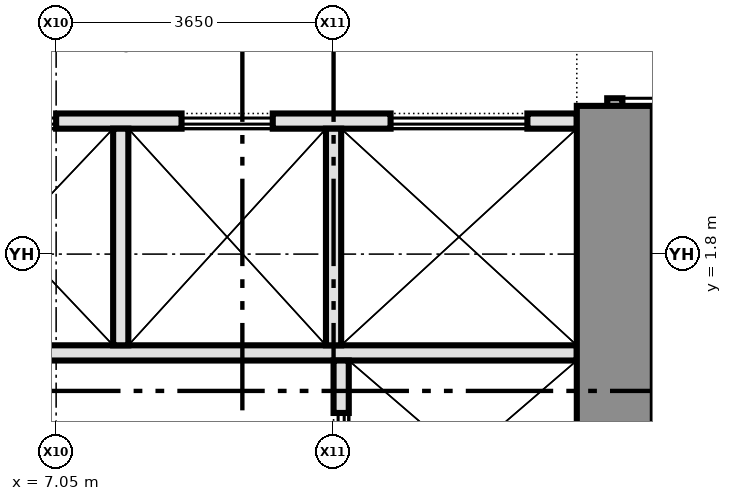
"""IFC4 building model, lengths in metres.
Left out: names, types, materials, properties, quantities, classifications, styles, units other than length and angle.
Written with IfcOpenShell. Run it as: python <this file> out.ifc"""

import sys

from ifc_helpers import new_model, si_unit, direction, frame, frame_2d, origin, place, context, subcontext, project, spatial, rectangle, extrude, element, fill, save


model = new_model("IFC4")
c1 = context("Model", 3, precision=1e-05, world=origin(), true_north=direction((0.0, 1.0)))
c2 = subcontext(c1, "Body", "Model", "MODEL_VIEW")
j1 = project(units=[si_unit("LENGTHUNIT", "METRE"), si_unit("PLANEANGLEUNIT", "RADIAN")], contexts=[c1])
p1 = place(None, origin())
s1 = spatial("IfcSite", under=j1, at=p1, CompositionType="ELEMENT")
p2 = place(p1, origin())
s2 = spatial("IfcBuilding", under=s1, at=p2, CompositionType="ELEMENT")
p3 = place(p2, frame((0.0, 0.0, 95.2)))
s3 = spatial("IfcBuildingStorey", under=s2, at=p3, CompositionType="ELEMENT", Elevation=95.2)
p4 = place(p3, frame((14.4, 5.75, 0.0), z_axis=(0.0, 0.0, 1.0), x_axis=(0.0, -1.0, 0.0)))
e1 = element("IfcWall", 1, at=p4, inside=s3, PredefinedType="PARTITIONING", context=c2, shape_type="SweptSolid", body=[
    extrude(rectangle(XDim=2.0, YDim=0.2, at=frame_2d((1.0, 0.0))), origin(), (0.0, 0.0, 1.0), 2.4),
])
p5 = place(p4, frame((0.1, 0.0, 0.0)))
e2 = element("IfcOpeningElement", 2, at=p5, cuts=e1, PredefinedType="OPENING", context=c2, shape_type="SweptSolid", body=[
    extrude(rectangle(XDim=1.8, YDim=2.1, at=frame_2d((0.9, 1.05))), frame((0.0, 0.11, 0.0), z_axis=(0.0, -1.0, 0.0), x_axis=(1.0, 0.0, 0.0)), (0.0, 0.0, 1.0), 0.22),
])
p6 = place(p3, frame((14.4, 3.75, 0.0), z_axis=(0.0, 0.0, 1.0), x_axis=(0.0, -1.0, 0.0)))
e3 = element("IfcWall", 3, at=p6, inside=s3, PredefinedType="SHEAR", context=c2, shape_type="SweptSolid", body=[
    extrude(rectangle(XDim=6.13, YDim=1.0, at=frame_2d((3.065, 0.0))), origin(), (0.0, 0.0, 1.0), 4.2),
])
p7 = place(p3, frame((13.9, 3.55, 0.0), z_axis=(0.0, 0.0, 1.0), x_axis=(-1.0, 0.0, 0.0)))
e4 = element("IfcWall", 4, at=p7, inside=s3, PredefinedType="PARTITIONING", context=c2, shape_type="SweptSolid", body=[
    extrude(rectangle(XDim=8.8, YDim=0.2, at=frame_2d((4.4, 0.0))), origin(), (0.0, 0.0, 1.0), 4.2),
])
p8 = place(p7, frame((0.65, 0.0, 0.0)))
e5 = element("IfcOpeningElement", 5, at=p8, cuts=e4, PredefinedType="OPENING", context=c2, shape_type="SweptSolid", body=[
    extrude(rectangle(XDim=1.8, YDim=2.1, at=frame_2d((0.9, 1.05))), frame((0.0, 0.11, 0.0), z_axis=(0.0, -1.0, 0.0), x_axis=(1.0, 0.0, 0.0)), (0.0, 0.0, 1.0), 0.22),
])
p9 = place(p7, frame((4.0, 0.0, 0.0)))
e6 = element("IfcOpeningElement", 6, at=p9, cuts=e4, PredefinedType="OPENING", context=c2, shape_type="SweptSolid", body=[
    extrude(rectangle(XDim=1.2, YDim=2.1, at=frame_2d((0.6, 1.05))), frame((0.0, 0.11, 0.0), z_axis=(0.0, -1.0, 0.0), x_axis=(1.0, 0.0, 0.0)), (0.0, 0.0, 1.0), 0.22),
])
p10 = place(p7, frame((6.85, 0.0, 0.0)))
e7 = element("IfcOpeningElement", 7, at=p10, cuts=e4, PredefinedType="OPENING", context=c2, shape_type="SweptSolid", body=[
    extrude(rectangle(XDim=1.2, YDim=2.1, at=frame_2d((0.6, 1.05))), frame((0.0, 0.11, 0.0), z_axis=(0.0, -1.0, 0.0), x_axis=(1.0, 0.0, 0.0)), (0.0, 0.0, 1.0), 0.22),
])
p11 = place(p3, frame((13.9, 0.5, 0.0), z_axis=(0.0, 0.0, 1.0), x_axis=(-1.0, 0.0, 0.0)))
e8 = element("IfcWall", 8, at=p11, inside=s3, PredefinedType="PARTITIONING", context=c2, shape_type="SweptSolid", body=[
    extrude(rectangle(XDim=8.8, YDim=0.2, at=frame_2d((4.4, 0.0))), origin(), (0.0, 0.0, 1.0), 4.2),
])
p12 = place(p3, frame((10.8, 0.4, 0.0), z_axis=(0.0, 0.0, 1.0), x_axis=(0.0, -1.0, 0.0)))
e9 = element("IfcWall", 9, at=p12, inside=s3, PredefinedType="PARTITIONING", context=c2, shape_type="SweptSolid", body=[
    extrude(rectangle(XDim=2.58, YDim=0.2, at=frame_2d((1.29, 0.0))), origin(), (0.0, 0.0, 1.0), 4.2),
])
p13 = place(p12, frame((0.69, 0.0, 0.0)))
e10 = element("IfcOpeningElement", 10, at=p13, cuts=e9, PredefinedType="OPENING", context=c2, shape_type="SweptSolid", body=[
    extrude(rectangle(XDim=1.2, YDim=2.1, at=frame_2d((0.6, 1.05))), frame((0.0, 0.11, 0.0), z_axis=(0.0, -1.0, 0.0), x_axis=(1.0, 0.0, 0.0)), (0.0, 0.0, 1.0), 0.22),
])
for number, where, z_axis, x_axis in (
    (11, (10.7, 3.45, 0.0), (0.0, 0.0, 1.0), (0.0, -1.0, 0.0)),
    (12, (7.9, 3.45, 0.0), (0.0, 0.0, 1.0), (0.0, -1.0, 0.0)),
):
    element("IfcWall", number, at=place(p3, frame(where, z_axis=z_axis, x_axis=x_axis)), inside=s3, PredefinedType="PARTITIONING", context=c2, shape_type="SweptSolid", body=[
        extrude(rectangle(XDim=2.85, YDim=0.2, at=frame_2d((1.425, 0.0))), origin(), (0.0, 0.0, 1.0), 4.2),
    ])
p14 = place(p5, origin())
e13 = element("IfcDoor", 13, at=p14, inside=s3, OperationType="DOUBLE_DOOR_SINGLE_SWING", PredefinedType="DOOR", context=c2, shape_type="SweptSolid", body=[
    extrude(rectangle(XDim=1.8, YDim=2.1, at=frame_2d((0.9, 1.05))), frame((0.0, 0.025, 0.0), z_axis=(0.0, -1.0, 0.0), x_axis=(1.0, 0.0, 0.0)), (0.0, 0.0, 1.0), 0.05),
])
fill(e2, e13)
p15 = place(p8, origin())
e14 = element("IfcDoor", 14, at=p15, inside=s3, OperationType="DOUBLE_DOOR_SLIDING", PredefinedType="DOOR", context=c2, shape_type="SweptSolid", body=[
    extrude(rectangle(XDim=1.8, YDim=2.1, at=frame_2d((0.9, 1.05))), frame((0.0, 0.025, 0.0), z_axis=(0.0, -1.0, 0.0), x_axis=(1.0, 0.0, 0.0)), (0.0, 0.0, 1.0), 0.05),
])
fill(e5, e14)
p16 = place(p9, origin())
e15 = element("IfcDoor", 15, at=p16, inside=s3, OperationType="DOUBLE_DOOR_SLIDING", PredefinedType="DOOR", context=c2, shape_type="SweptSolid", body=[
    extrude(rectangle(XDim=1.2, YDim=2.1, at=frame_2d((0.6, 1.05))), frame((0.0, 0.025, 0.0), z_axis=(0.0, -1.0, 0.0), x_axis=(1.0, 0.0, 0.0)), (0.0, 0.0, 1.0), 0.05),
])
fill(e6, e15)
p17 = place(p10, origin())
e16 = element("IfcDoor", 16, at=p17, inside=s3, OperationType="DOUBLE_DOOR_SLIDING", PredefinedType="DOOR", context=c2, shape_type="SweptSolid", body=[
    extrude(rectangle(XDim=1.2, YDim=2.1, at=frame_2d((0.6, 1.05))), frame((0.0, 0.025, 0.0), z_axis=(0.0, -1.0, 0.0), x_axis=(1.0, 0.0, 0.0)), (0.0, 0.0, 1.0), 0.05),
])
fill(e7, e16)
p18 = place(p13, origin())
e17 = element("IfcDoor", 17, at=p18, inside=s3, OperationType="DOUBLE_DOOR_SLIDING", PredefinedType="DOOR", context=c2, shape_type="SweptSolid", body=[
    extrude(rectangle(XDim=1.2, YDim=2.1, at=frame_2d((0.6, 1.05))), frame((0.0, 0.025, 0.0), z_axis=(0.0, -1.0, 0.0), x_axis=(1.0, 0.0, 0.0)), (0.0, 0.0, 1.0), 0.05),
])
fill(e10, e17)
save(model, sys.argv[1])
